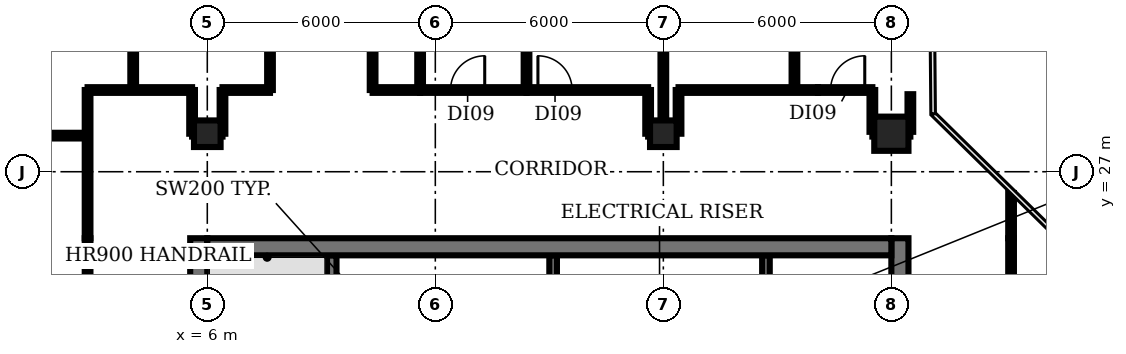
"""IFC4 building model, lengths in metres.
Left out: names, types, materials, properties, quantities, classifications, styles, units other than length and angle.
Written with IfcOpenShell. Run it as: python <this file> out.ifc"""

import sys

from ifc_helpers import new_model, si_unit, direction, frame, frame_2d, origin, origin_2d, place, context, subcontext, project, spatial, rectangle, circle, extrude, element, fill, save


model = new_model("IFC4")
c1 = context("Model", 3, precision=1e-05, world=origin(), true_north=direction((0.0, 1.0)))
c2 = subcontext(c1, "Body", "Model", "MODEL_VIEW")
j1 = project(units=[si_unit("LENGTHUNIT", "METRE"), si_unit("PLANEANGLEUNIT", "RADIAN")], contexts=[c1])
p1 = place(None, origin())
s1 = spatial("IfcSite", under=j1, at=p1, CompositionType="ELEMENT")
p2 = place(p1, origin())
s2 = spatial("IfcBuilding", under=s1, at=p2, CompositionType="ELEMENT")
p3 = place(p2, frame((0.0, 0.0, 226.4)))
s3 = spatial("IfcBuildingStorey", under=s2, at=p3, CompositionType="ELEMENT", Elevation=226.4)
for number, where, z_axis, x_axis in (
    (1, (6.0, 28.0, 0.0), (0.0, 0.0, 1.0), (1.0, 0.0, 0.0)),
    (2, (18.0, 28.0, 0.0), (0.0, 0.0, 1.0), (1.0, 0.0, 0.0)),
):
    element("IfcColumn", number, at=place(p3, frame(where, z_axis=z_axis, x_axis=x_axis)), inside=s3, PredefinedType="COLUMN", context=c2, shape_type="SweptSolid", body=[
        extrude(rectangle(XDim=0.7, YDim=0.7, at=origin_2d()), origin(), (0.0, 0.0, 1.0), 3.85),
    ])
p4 = place(p3, frame((24.0, 28.0, 0.0), z_axis=(0.0, 0.0, 1.0), x_axis=(1.0, 0.0, 0.0)))
e3 = element("IfcColumn", 3, at=p4, inside=s3, PredefinedType="COLUMN", context=c2, shape_type="SweptSolid", body=[
    extrude(circle(Radius=0.45, at=origin_2d()), origin(), (0.0, 0.0, 1.0), 3.85),
])
p5 = place(p3, frame((9.275, 18.375, 0.0), z_axis=(0.0, 0.0, 1.0), x_axis=(0.0, 1.0, 0.0)))
e4 = element("IfcWall", 4, at=p5, inside=s3, PredefinedType="SHEAR", context=c2, shape_type="SweptSolid", body=[
    extrude(rectangle(XDim=6.425, YDim=0.25, at=frame_2d((3.212, 0.0))), origin(), (0.0, 0.0, 1.0), 3.85),
])
for number, where, z_axis, x_axis in (
    (5, (15.1, 22.9, 0.0), (0.0, 0.0, 1.0), (0.0, 1.0, 0.0)),
    (6, (20.7, 22.9, 0.0), (0.0, 0.0, 1.0), (0.0, 1.0, 0.0)),
):
    element("IfcWall", number, at=place(p3, frame(where, z_axis=z_axis, x_axis=x_axis)), inside=s3, PredefinedType="SHEAR", context=c2, shape_type="SweptSolid", body=[
        extrude(rectangle(XDim=1.9, YDim=0.2, at=frame_2d((0.95, 0.0))), origin(), (0.0, 0.0, 1.0), 3.85),
    ])
p6 = place(p3, frame((5.775, 4.42, 0.0), z_axis=(0.0, 0.0, 1.0), x_axis=(0.0, 1.0, 0.0)))
e7 = element("IfcWall", 7, at=p6, inside=s3, PredefinedType="SHEAR", context=c2, shape_type="SweptSolid", body=[
    extrude(rectangle(XDim=20.83, YDim=0.45, at=frame_2d((10.415, 0.0))), origin(), (0.0, 0.0, 1.0), 3.85),
])
p7 = place(p6, frame((1.23, 0.0, 0.0)))
e8 = element("IfcOpeningElement", 8, at=p7, cuts=e7, PredefinedType="OPENING", context=c2, shape_type="SweptSolid", body=[
    extrude(rectangle(XDim=1.5, YDim=2.1, at=frame_2d((0.75, 1.05))), frame((0.0, 0.235, 0.0), z_axis=(0.0, -1.0, 0.0), x_axis=(1.0, 0.0, 0.0)), (0.0, 0.0, 1.0), 0.47),
])
p8 = place(p6, frame((7.68, 0.0, 0.0)))
e9 = element("IfcOpeningElement", 9, at=p8, cuts=e7, PredefinedType="OPENING", context=c2, shape_type="SweptSolid", body=[
    extrude(rectangle(XDim=1.2, YDim=2.1, at=frame_2d((0.6, 1.05))), frame((0.0, 0.235, 0.0), z_axis=(0.0, -1.0, 0.0), x_axis=(1.0, 0.0, 0.0)), (0.0, 0.0, 1.0), 0.47),
])
p9 = place(p6, frame((14.23, 0.0, 0.0)))
e10 = element("IfcOpeningElement", 10, at=p9, cuts=e7, PredefinedType="OPENING", context=c2, shape_type="SweptSolid", body=[
    extrude(rectangle(XDim=1.2, YDim=2.1, at=frame_2d((0.6, 1.05))), frame((0.0, 0.235, 0.0), z_axis=(0.0, -1.0, 0.0), x_axis=(1.0, 0.0, 0.0)), (0.0, 0.0, 1.0), 0.47),
])
p10 = place(p3, frame((24.225, 25.25, 0.0), z_axis=(0.0, 0.0, 1.0), x_axis=(0.0, -1.0, 0.0)))
e11 = element("IfcWall", 11, at=p10, inside=s3, PredefinedType="SHEAR", context=c2, shape_type="SweptSolid", body=[
    extrude(rectangle(XDim=20.83, YDim=0.45, at=frame_2d((10.415, 0.0))), origin(), (0.0, 0.0, 1.0), 3.85),
])
p11 = place(p10, frame((18.1, 0.0, 0.0)))
e12 = element("IfcOpeningElement", 12, at=p11, cuts=e11, PredefinedType="OPENING", context=c2, shape_type="SweptSolid", body=[
    extrude(rectangle(XDim=1.5, YDim=2.1, at=frame_2d((0.75, 1.05))), frame((0.0, 0.235, 0.0), z_axis=(0.0, -1.0, 0.0), x_axis=(1.0, 0.0, 0.0)), (0.0, 0.0, 1.0), 0.47),
])
p12 = place(p10, frame((12.0, 0.0, 0.0)))
e13 = element("IfcOpeningElement", 13, at=p12, cuts=e11, PredefinedType="OPENING", context=c2, shape_type="SweptSolid", body=[
    extrude(rectangle(XDim=0.9, YDim=2.1, at=frame_2d((0.45, 1.05))), frame((0.0, 0.235, 0.0), z_axis=(0.0, -1.0, 0.0), x_axis=(1.0, 0.0, 0.0)), (0.0, 0.0, 1.0), 0.47),
])
p13 = place(p10, frame((6.0, 0.0, 0.0)))
e14 = element("IfcOpeningElement", 14, at=p13, cuts=e11, PredefinedType="OPENING", context=c2, shape_type="SweptSolid", body=[
    extrude(rectangle(XDim=2.0, YDim=2.1, at=frame_2d((1.0, 1.05))), frame((0.0, 0.235, 0.0), z_axis=(0.0, -1.0, 0.0), x_axis=(1.0, 0.0, 0.0)), (0.0, 0.0, 1.0), 0.47),
])
p14 = place(p3, frame((6.0, 25.025, 0.0), z_axis=(0.0, 0.0, 1.0), x_axis=(1.0, 0.0, 0.0)))
e15 = element("IfcWall", 15, at=p14, inside=s3, PredefinedType="SHEAR", context=c2, shape_type="SweptSolid", body=[
    extrude(rectangle(XDim=18.0, YDim=0.45, at=frame_2d((9.0, 0.0))), origin(), (0.0, 0.0, 1.0), 3.85),
])
p15 = place(p3, frame((-0.98, 27.95, 0.0), z_axis=(0.0, 0.0, 1.0), x_axis=(1.0, 0.0, 0.0)))
e16 = element("IfcWall", 16, at=p15, inside=s3, PredefinedType="PARTITIONING", context=c2, shape_type="SweptSolid", body=[
    extrude(rectangle(XDim=3.83, YDim=0.15, at=frame_2d((1.915, 0.0))), origin(), (0.0, 0.0, 1.0), 2.88),
])
p16 = place(p3, frame((2.85, 5.77, 0.0), z_axis=(0.0, 0.0, 1.0), x_axis=(0.0, 1.0, 0.0)))
e17 = element("IfcWall", 17, at=p16, inside=s3, PredefinedType="PARTITIONING", context=c2, shape_type="SweptSolid", body=[
    extrude(rectangle(XDim=19.48, YDim=0.15, at=frame_2d((9.74, 0.0))), origin(), (0.0, 0.0, 1.0), 2.88),
])
p17 = place(p16, frame((8.48, 0.0, 0.0)))
e18 = element("IfcOpeningElement", 18, at=p17, cuts=e17, PredefinedType="OPENING", context=c2, shape_type="SweptSolid", body=[
    extrude(rectangle(XDim=1.2, YDim=2.1, at=frame_2d((0.6, 1.05))), frame((0.0, 0.085, 0.0), z_axis=(0.0, -1.0, 0.0), x_axis=(1.0, 0.0, 0.0)), (0.0, 0.0, 1.0), 0.17),
])
p18 = place(p3, frame((2.85, 25.25, 0.0), z_axis=(0.0, 0.0, 1.0), x_axis=(0.0, 1.0, 0.0)))
e19 = element("IfcWall", 19, at=p18, inside=s3, PredefinedType="PARTITIONING", context=c2, shape_type="SweptSolid", body=[
    extrude(rectangle(XDim=3.9, YDim=0.15, at=frame_2d((1.95, 0.0))), origin(), (0.0, 0.0, 1.0), 2.88),
])
p19 = place(p3, frame((2.85, 29.15, 0.0), z_axis=(0.0, 0.0, 1.0), x_axis=(1.0, 0.0, 0.0)))
e20 = element("IfcWall", 20, at=p19, inside=s3, PredefinedType="PARTITIONING", context=c2, shape_type="SweptSolid", body=[
    extrude(rectangle(XDim=2.75, YDim=0.15, at=frame_2d((1.375, 0.0))), origin(), (0.0, 0.0, 1.0), 2.88),
])
p20 = place(p3, frame((4.05, 29.15, 0.0), z_axis=(0.0, 0.0, 1.0), x_axis=(0.0, 1.0, 0.0)))
e21 = element("IfcWall", 21, at=p20, inside=s3, PredefinedType="PARTITIONING", context=c2, shape_type="SweptSolid", body=[
    extrude(rectangle(XDim=4.8, YDim=0.15, at=frame_2d((2.4, 0.0))), origin(), (0.0, 0.0, 1.0), 2.88),
])
p21 = place(p3, frame((5.6, 28.0, 0.0), z_axis=(0.0, 0.0, 1.0), x_axis=(0.0, 1.0, 0.0)))
e22 = element("IfcWall", 22, at=p21, inside=s3, PredefinedType="PARTITIONING", context=c2, shape_type="SweptSolid", body=[
    extrude(rectangle(XDim=1.15, YDim=0.15, at=frame_2d((0.575, 0.0))), origin(), (0.0, 0.0, 1.0), 2.88),
])
p22 = place(p3, frame((5.6, 28.0, 0.0), z_axis=(0.0, 0.0, 1.0), x_axis=(1.0, 0.0, 0.0)))
e23 = element("IfcWall", 23, at=p22, inside=s3, PredefinedType="PARTITIONING", context=c2, shape_type="SweptSolid", body=[
    extrude(rectangle(XDim=0.8, YDim=0.15, at=frame_2d((0.4, 0.0))), origin(), (0.0, 0.0, 1.0), 2.88),
])
p23 = place(p3, frame((6.4, 28.0, 0.0), z_axis=(0.0, 0.0, 1.0), x_axis=(0.0, 1.0, 0.0)))
e24 = element("IfcWall", 24, at=p23, inside=s3, PredefinedType="PARTITIONING", context=c2, shape_type="SweptSolid", body=[
    extrude(rectangle(XDim=1.15, YDim=0.15, at=frame_2d((0.575, 0.0))), origin(), (0.0, 0.0, 1.0), 2.88),
])
p24 = place(p3, frame((6.4, 29.15, 0.0), z_axis=(0.0, 0.0, 1.0), x_axis=(1.0, 0.0, 0.0)))
e25 = element("IfcWall", 25, at=p24, inside=s3, PredefinedType="PARTITIONING", context=c2, shape_type="SweptSolid", body=[
    extrude(rectangle(XDim=1.25, YDim=0.15, at=frame_2d((0.625, 0.0))), origin(), (0.0, 0.0, 1.0), 2.88),
])
p25 = place(p3, frame((7.65, 29.15, 0.0), z_axis=(0.0, 0.0, 1.0), x_axis=(0.0, 1.0, 0.0)))
e26 = element("IfcWall", 26, at=p25, inside=s3, PredefinedType="PARTITIONING", context=c2, shape_type="SweptSolid", body=[
    extrude(rectangle(XDim=4.8, YDim=0.15, at=frame_2d((2.4, 0.0))), origin(), (0.0, 0.0, 1.0), 2.88),
])
p26 = place(p25, frame((1.9, 0.0, 0.0)))
e27 = element("IfcOpeningElement", 27, at=p26, cuts=e26, PredefinedType="OPENING", context=c2, shape_type="SweptSolid", body=[
    extrude(rectangle(XDim=0.9, YDim=2.1, at=frame_2d((0.45, 1.05))), frame((0.0, 0.085, 0.0), z_axis=(0.0, -1.0, 0.0), x_axis=(1.0, 0.0, 0.0)), (0.0, 0.0, 1.0), 0.17),
])
p27 = place(p3, frame((10.35, 29.15, 0.0), z_axis=(0.0, 0.0, 1.0), x_axis=(0.0, 1.0, 0.0)))
e28 = element("IfcWall", 28, at=p27, inside=s3, PredefinedType="PARTITIONING", context=c2, shape_type="SweptSolid", body=[
    extrude(rectangle(XDim=4.8, YDim=0.15, at=frame_2d((2.4, 0.0))), origin(), (0.0, 0.0, 1.0), 2.88),
])
p28 = place(p3, frame((10.35, 29.15, 0.0), z_axis=(0.0, 0.0, 1.0), x_axis=(1.0, 0.0, 0.0)))
e29 = element("IfcWall", 29, at=p28, inside=s3, PredefinedType="PARTITIONING", context=c2, shape_type="SweptSolid", body=[
    extrude(rectangle(XDim=1.25, YDim=0.15, at=frame_2d((0.625, 0.0))), origin(), (0.0, 0.0, 1.0), 2.88),
])
p29 = place(p3, frame((11.6, 29.15, 0.0), z_axis=(0.0, 0.0, 1.0), x_axis=(0.0, 1.0, 0.0)))
e30 = element("IfcWall", 30, at=p29, inside=s3, PredefinedType="PARTITIONING", context=c2, shape_type="SweptSolid", body=[
    extrude(rectangle(XDim=4.72, YDim=0.15, at=frame_2d((2.36, 0.0))), origin(), (0.0, 0.0, 1.0), 2.88),
])
p30 = place(p3, frame((11.6, 29.15, 0.0), z_axis=(0.0, 0.0, 1.0), x_axis=(1.0, 0.0, 0.0)))
e31 = element("IfcWall", 31, at=p30, inside=s3, PredefinedType="PARTITIONING", context=c2, shape_type="SweptSolid", body=[
    extrude(rectangle(XDim=2.8, YDim=0.15, at=frame_2d((1.4, 0.0))), origin(), (0.0, 0.0, 1.0), 2.88),
])
p31 = place(p30, frame((0.8, 0.0, 0.0)))
e32 = element("IfcOpeningElement", 32, at=p31, cuts=e31, PredefinedType="OPENING", context=c2, shape_type="SweptSolid", body=[
    extrude(rectangle(XDim=0.9, YDim=2.1, at=frame_2d((0.45, 1.05))), frame((0.0, 0.085, 0.0), z_axis=(0.0, -1.0, 0.0), x_axis=(1.0, 0.0, 0.0)), (0.0, 0.0, 1.0), 0.17),
])
p32 = place(p3, frame((14.4, 29.15, 0.0), z_axis=(0.0, 0.0, 1.0), x_axis=(0.0, 1.0, 0.0)))
e33 = element("IfcWall", 33, at=p32, inside=s3, PredefinedType="PARTITIONING", context=c2, shape_type="SweptSolid", body=[
    extrude(rectangle(XDim=4.8, YDim=0.15, at=frame_2d((2.4, 0.0))), origin(), (0.0, 0.0, 1.0), 2.88),
])
p33 = place(p3, frame((14.4, 29.15, 0.0), z_axis=(0.0, 0.0, 1.0), x_axis=(1.0, 0.0, 0.0)))
e34 = element("IfcWall", 34, at=p33, inside=s3, PredefinedType="PARTITIONING", context=c2, shape_type="SweptSolid", body=[
    extrude(rectangle(XDim=3.2, YDim=0.15, at=frame_2d((1.6, 0.0))), origin(), (0.0, 0.0, 1.0), 2.88),
])
p34 = place(p33, frame((0.3, 0.0, 0.0)))
e35 = element("IfcOpeningElement", 35, at=p34, cuts=e34, PredefinedType="OPENING", context=c2, shape_type="SweptSolid", body=[
    extrude(rectangle(XDim=0.9, YDim=2.1, at=frame_2d((0.45, 1.05))), frame((0.0, 0.085, 0.0), z_axis=(0.0, -1.0, 0.0), x_axis=(1.0, 0.0, 0.0)), (0.0, 0.0, 1.0), 0.17),
])
p35 = place(p3, frame((17.6, 28.0, 0.0), z_axis=(0.0, 0.0, 1.0), x_axis=(0.0, 1.0, 0.0)))
e36 = element("IfcWall", 36, at=p35, inside=s3, PredefinedType="PARTITIONING", context=c2, shape_type="SweptSolid", body=[
    extrude(rectangle(XDim=1.15, YDim=0.15, at=frame_2d((0.575, 0.0))), origin(), (0.0, 0.0, 1.0), 2.88),
])
p36 = place(p3, frame((17.6, 28.0, 0.0), z_axis=(0.0, 0.0, 1.0), x_axis=(1.0, 0.0, 0.0)))
e37 = element("IfcWall", 37, at=p36, inside=s3, PredefinedType="PARTITIONING", context=c2, shape_type="SweptSolid", body=[
    extrude(rectangle(XDim=0.4, YDim=0.15, at=frame_2d((0.2, 0.0))), origin(), (0.0, 0.0, 1.0), 2.88),
])
p37 = place(p3, frame((18.0, 28.0, 0.0), z_axis=(0.0, 0.0, 1.0), x_axis=(0.0, 1.0, 0.0)))
e38 = element("IfcWall", 38, at=p37, inside=s3, PredefinedType="PARTITIONING", context=c2, shape_type="SweptSolid", body=[
    extrude(rectangle(XDim=5.95, YDim=0.15, at=frame_2d((2.975, 0.0))), origin(), (0.0, 0.0, 1.0), 2.88),
])
p38 = place(p3, frame((18.4, 28.0, 0.0), z_axis=(0.0, 0.0, 1.0), x_axis=(0.0, 1.0, 0.0)))
e39 = element("IfcWall", 39, at=p38, inside=s3, PredefinedType="PARTITIONING", context=c2, shape_type="SweptSolid", body=[
    extrude(rectangle(XDim=1.15, YDim=0.15, at=frame_2d((0.575, 0.0))), origin(), (0.0, 0.0, 1.0), 2.88),
])
p39 = place(p3, frame((18.4, 29.15, 0.0), z_axis=(0.0, 0.0, 1.0), x_axis=(1.0, 0.0, 0.0)))
e40 = element("IfcWall", 40, at=p39, inside=s3, PredefinedType="PARTITIONING", context=c2, shape_type="SweptSolid", body=[
    extrude(rectangle(XDim=3.67, YDim=0.15, at=frame_2d((1.835, 0.0))), origin(), (0.0, 0.0, 1.0), 2.88),
])
p40 = place(p3, frame((21.45, 29.15, 0.0), z_axis=(0.0, 0.0, 1.0), x_axis=(0.0, 1.0, 0.0)))
e41 = element("IfcWall", 41, at=p40, inside=s3, PredefinedType="PARTITIONING", context=c2, shape_type="SweptSolid", body=[
    extrude(rectangle(XDim=4.8, YDim=0.15, at=frame_2d((2.4, 0.0))), origin(), (0.0, 0.0, 1.0), 2.88),
])
p41 = place(p3, frame((22.07, 29.15, 0.0), z_axis=(0.0, 0.0, 1.0), x_axis=(1.0, 0.0, 0.0)))
e42 = element("IfcWall", 42, at=p41, inside=s3, PredefinedType="PARTITIONING", context=c2, shape_type="SweptSolid", body=[
    extrude(rectangle(XDim=1.43, YDim=0.15, at=frame_2d((0.715, 0.0))), origin(), (0.0, 0.0, 1.0), 2.88),
])
p42 = place(p41, frame((0.33, 0.0, 0.0)))
e43 = element("IfcOpeningElement", 43, at=p42, cuts=e42, PredefinedType="OPENING", context=c2, shape_type="SweptSolid", body=[
    extrude(rectangle(XDim=0.9, YDim=2.1, at=frame_2d((0.45, 1.05))), frame((0.0, 0.085, 0.0), z_axis=(0.0, -1.0, 0.0), x_axis=(1.0, 0.0, 0.0)), (0.0, 0.0, 1.0), 0.17),
])
p43 = place(p3, frame((23.5, 28.0, 0.0), z_axis=(0.0, 0.0, 1.0), x_axis=(1.0, 0.0, 0.0)))
e44 = element("IfcWall", 44, at=p43, inside=s3, PredefinedType="PARTITIONING", context=c2, shape_type="SweptSolid", body=[
    extrude(rectangle(XDim=1.0, YDim=0.15, at=frame_2d((0.5, 0.0))), origin(), (0.0, 0.0, 1.0), 2.88),
])
p44 = place(p3, frame((23.5, 28.05, 0.0), z_axis=(0.0, 0.0, 1.0), x_axis=(0.0, 1.0, 0.0)))
e45 = element("IfcWall", 45, at=p44, inside=s3, PredefinedType="PARTITIONING", context=c2, shape_type="SweptSolid", body=[
    extrude(rectangle(XDim=1.1, YDim=0.15, at=frame_2d((0.55, 0.0))), origin(), (0.0, 0.0, 1.0), 2.88),
])
p45 = place(p3, frame((24.5, 28.05, 0.0), z_axis=(0.0, 0.0, 1.0), x_axis=(0.0, 1.0, 0.0)))
e46 = element("IfcWall", 46, at=p45, inside=s3, PredefinedType="PARTITIONING", context=c2, shape_type="SweptSolid", body=[
    extrude(rectangle(XDim=0.99, YDim=0.15, at=frame_2d((0.495, 0.0))), origin(), (0.0, 0.0, 1.0), 2.88),
])
p46 = place(p3, frame((27.15, 25.25, 0.0), z_axis=(0.0, 0.0, 1.0), x_axis=(0.0, -1.0, 0.0)))
e47 = element("IfcWall", 47, at=p46, inside=s3, PredefinedType="PARTITIONING", context=c2, shape_type="SweptSolid", body=[
    extrude(rectangle(XDim=4.85, YDim=0.15, at=frame_2d((2.425, 0.0))), origin(), (0.0, 0.0, 1.0), 2.88),
])
p47 = place(p46, frame((1.55, 0.0, 0.0)))
e48 = element("IfcOpeningElement", 48, at=p47, cuts=e47, PredefinedType="OPENING", context=c2, shape_type="SweptSolid", body=[
    extrude(rectangle(XDim=1.0, YDim=2.1, at=frame_2d((0.5, 1.05))), frame((0.0, 0.085, 0.0), z_axis=(0.0, -1.0, 0.0), x_axis=(1.0, 0.0, 0.0)), (0.0, 0.0, 1.0), 0.17),
])
p48 = place(p3, frame((27.15, 25.25, 0.0), z_axis=(0.0, 0.0, 1.0), x_axis=(0.0, 1.0, 0.0)))
e49 = element("IfcWall", 49, at=p48, inside=s3, PredefinedType="PARTITIONING", context=c2, shape_type="SweptSolid", body=[
    extrude(rectangle(XDim=1.19, YDim=0.15, at=frame_2d((0.595, 0.0))), origin(), (0.0, 0.0, 1.0), 2.88),
])
p49 = place(p31, origin())
e50 = element("IfcDoor", 50, at=p49, inside=s3, OperationType="SINGLE_SWING_RIGHT", PredefinedType="DOOR", context=c2, shape_type="SweptSolid", body=[
    extrude(rectangle(XDim=0.9, YDim=2.1, at=frame_2d((0.45, 1.05))), frame((0.0, 0.025, 0.0), z_axis=(0.0, -1.0, 0.0), x_axis=(1.0, 0.0, 0.0)), (0.0, 0.0, 1.0), 0.05),
])
fill(e32, e50)
p50 = place(p34, origin())
e51 = element("IfcDoor", 51, at=p50, inside=s3, OperationType="SINGLE_SWING_LEFT", PredefinedType="DOOR", context=c2, shape_type="SweptSolid", body=[
    extrude(rectangle(XDim=0.9, YDim=2.1, at=frame_2d((0.45, 1.05))), frame((0.0, 0.025, 0.0), z_axis=(0.0, -1.0, 0.0), x_axis=(1.0, 0.0, 0.0)), (0.0, 0.0, 1.0), 0.05),
])
fill(e35, e51)
p51 = place(p42, origin())
e52 = element("IfcDoor", 52, at=p51, inside=s3, OperationType="SINGLE_SWING_RIGHT", PredefinedType="DOOR", context=c2, shape_type="SweptSolid", body=[
    extrude(rectangle(XDim=0.9, YDim=2.1, at=frame_2d((0.45, 1.05))), frame((0.0, 0.025, 0.0), z_axis=(0.0, -1.0, 0.0), x_axis=(1.0, 0.0, 0.0)), (0.0, 0.0, 1.0), 0.05),
])
fill(e43, e52)
save(model, sys.argv[1])
